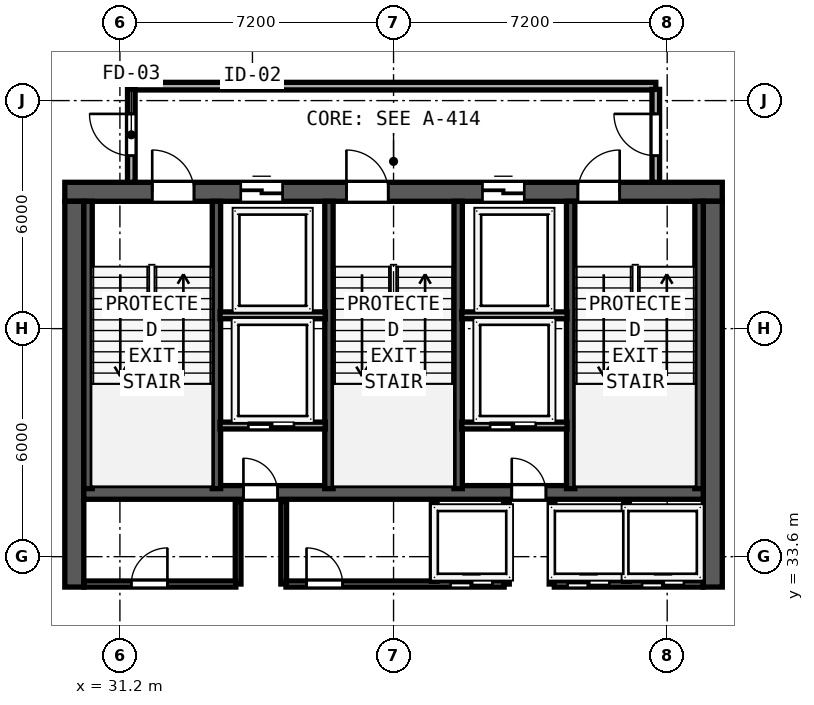
"""IFC4 building model, lengths in metres.
Left out: names, types, materials, properties, quantities, classifications, styles, units other than length and angle.
Written with IfcOpenShell. Run it as: python <this file> out.ifc"""

import sys

from ifc_helpers import new_model, si_unit, direction, frame, frame_2d, origin, place, context, subcontext, project, spatial, rectangle, extrude, element, fill, save


model = new_model("IFC4")
c1 = context("Model", 3, precision=1e-05, world=origin(), true_north=direction((0.0, 1.0)))
c2 = subcontext(c1, "Body", "Model", "MODEL_VIEW")
j1 = project(units=[si_unit("LENGTHUNIT", "METRE"), si_unit("PLANEANGLEUNIT", "RADIAN")], contexts=[c1])
p1 = place(None, origin())
s1 = spatial("IfcSite", under=j1, at=p1, CompositionType="ELEMENT")
p2 = place(p1, origin())
s2 = spatial("IfcBuilding", under=s1, at=p2, CompositionType="ELEMENT")
p3 = place(p2, frame((0.0, 0.0, 286.1)))
s3 = spatial("IfcBuildingStorey", under=s2, at=p3, CompositionType="ELEMENT", Elevation=286.1)
p4 = place(p3, frame((29.75, 43.2, 0.0), z_axis=(0.0, 0.0, 1.0), x_axis=(1.0, 0.0, 0.0)))
e1 = element("IfcWall", 1, at=p4, inside=s3, PredefinedType="SHEAR", context=c2, shape_type="SweptSolid", body=[
    extrude(rectangle(XDim=17.3, YDim=0.5, at=frame_2d((8.65, 0.0))), origin(), (0.0, 0.0, 1.0), 3.72),
])
p5 = place(p4, frame((2.3, 0.0, 0.0)))
e2 = element("IfcOpeningElement", 2, at=p5, cuts=e1, PredefinedType="OPENING", context=c2, shape_type="SweptSolid", body=[
    extrude(rectangle(XDim=1.1, YDim=2.15, at=frame_2d((0.55, 1.075))), frame((0.0, 0.26, 0.0), z_axis=(0.0, -1.0, 0.0), x_axis=(1.0, 0.0, 0.0)), (0.0, 0.0, 1.0), 0.52),
])
p6 = place(p4, frame((7.41, 0.0, 0.0)))
e3 = element("IfcOpeningElement", 3, at=p6, cuts=e1, PredefinedType="OPENING", context=c2, shape_type="SweptSolid", body=[
    extrude(rectangle(XDim=1.1, YDim=2.15, at=frame_2d((0.55, 1.075))), frame((0.0, 0.26, 0.0), z_axis=(0.0, -1.0, 0.0), x_axis=(1.0, 0.0, 0.0)), (0.0, 0.0, 1.0), 0.52),
])
p7 = place(p4, frame((13.5, 0.0, 0.0)))
e4 = element("IfcOpeningElement", 4, at=p7, cuts=e1, PredefinedType="OPENING", context=c2, shape_type="SweptSolid", body=[
    extrude(rectangle(XDim=1.1, YDim=2.15, at=frame_2d((0.55, 1.075))), frame((0.0, 0.26, 0.0), z_axis=(0.0, -1.0, 0.0), x_axis=(1.0, 0.0, 0.0)), (0.0, 0.0, 1.0), 0.52),
])
p8 = place(p4, frame((4.63, 0.0, 0.0)))
e5 = element("IfcOpeningElement", 5, at=p8, cuts=e1, PredefinedType="OPENING", context=c2, shape_type="SweptSolid", body=[
    extrude(rectangle(XDim=1.1, YDim=2.2, at=frame_2d((0.55, 1.1))), frame((0.0, 0.26, 0.0), z_axis=(0.0, -1.0, 0.0), x_axis=(1.0, 0.0, 0.0)), (0.0, 0.0, 1.0), 0.52),
])
p9 = place(p4, frame((10.99, 0.0, 0.0)))
e6 = element("IfcOpeningElement", 6, at=p9, cuts=e1, PredefinedType="OPENING", context=c2, shape_type="SweptSolid", body=[
    extrude(rectangle(XDim=1.1, YDim=2.2, at=frame_2d((0.55, 1.1))), frame((0.0, 0.26, 0.0), z_axis=(0.0, -1.0, 0.0), x_axis=(1.0, 0.0, 0.0)), (0.0, 0.0, 1.0), 0.52),
])
for number, where, z_axis, x_axis in (
    (7, (30.0, 32.8, 0.0), (0.0, 0.0, 1.0), (0.0, 1.0, 0.0)),
    (8, (46.8, 32.8, 0.0), (0.0, 0.0, 1.0), (0.0, 1.0, 0.0)),
):
    element("IfcWall", number, at=place(p3, frame(where, z_axis=z_axis, x_axis=x_axis)), inside=s3, PredefinedType="SHEAR", context=c2, shape_type="SweptSolid", body=[
        extrude(rectangle(XDim=10.15, YDim=0.5, at=frame_2d((5.075, 0.0))), origin(), (0.0, 0.0, 1.0), 3.72),
    ])
p10 = place(p3, frame((30.25, 35.29, 0.0), z_axis=(0.0, 0.0, 1.0), x_axis=(1.0, 0.0, 0.0)))
e9 = element("IfcWall", 9, at=p10, inside=s3, PredefinedType="SHEAR", context=c2, shape_type="SweptSolid", body=[
    extrude(rectangle(XDim=16.3, YDim=0.36, at=frame_2d((8.15, 0.0))), origin(), (0.0, 0.0, 1.0), 3.72),
])
p11 = place(p10, frame((5.1, 0.0, 0.0), z_axis=(0.0, 0.0, 1.0), x_axis=(-1.0, 0.0, 0.0)))
e10 = element("IfcOpeningElement", 10, at=p11, cuts=e9, PredefinedType="OPENING", context=c2, shape_type="SweptSolid", body=[
    extrude(rectangle(XDim=0.9, YDim=2.1, at=frame_2d((0.45, 1.05))), frame((0.0, 0.19, 0.0), z_axis=(0.0, -1.0, 0.0), x_axis=(1.0, 0.0, 0.0)), (0.0, 0.0, 1.0), 0.38),
])
p12 = place(p10, frame((12.16, 0.0, 0.0), z_axis=(0.0, 0.0, 1.0), x_axis=(-1.0, 0.0, 0.0)))
e11 = element("IfcOpeningElement", 11, at=p12, cuts=e9, PredefinedType="OPENING", context=c2, shape_type="SweptSolid", body=[
    extrude(rectangle(XDim=0.9, YDim=2.1, at=frame_2d((0.45, 1.05))), frame((0.0, 0.19, 0.0), z_axis=(0.0, -1.0, 0.0), x_axis=(1.0, 0.0, 0.0)), (0.0, 0.0, 1.0), 0.38),
])
for number, where, z_axis, x_axis in (
    (12, (30.362, 35.39, 0.0), (0.0, 0.0, 1.0), (0.0, 1.0, 0.0)),
    (13, (33.74, 35.39, 0.0), (0.0, 0.0, 1.0), (0.0, 1.0, 0.0)),
    (14, (36.7, 35.39, 0.0), (0.0, 0.0, 1.0), (0.0, 1.0, 0.0)),
    (15, (40.1, 35.39, 0.0), (0.0, 0.0, 1.0), (0.0, 1.0, 0.0)),
    (16, (43.06, 35.39, 0.0), (0.0, 0.0, 1.0), (0.0, 1.0, 0.0)),
    (17, (46.438, 35.39, 0.0), (0.0, 0.0, 1.0), (0.0, 1.0, 0.0)),
):
    element("IfcWall", number, at=place(p3, frame(where, z_axis=z_axis, x_axis=x_axis)), inside=s3, PredefinedType="SHEAR", context=c2, shape_type="SweptSolid", body=[
        extrude(rectangle(XDim=7.56, YDim=0.22, at=frame_2d((3.78, 0.0))), origin(), (0.0, 0.0, 1.0), 3.72),
    ])
p13 = place(p3, frame((31.5, 45.98, 0.0), z_axis=(0.0, 0.0, 1.0), x_axis=(1.0, 0.0, 0.0)))
e18 = element("IfcWall", 18, at=p13, inside=s3, PredefinedType="SOLIDWALL", context=c2, shape_type="SweptSolid", body=[
    extrude(rectangle(XDim=13.8, YDim=0.2, at=frame_2d((6.9, 0.0))), origin(), (0.0, 0.0, 1.0), 3.72),
])
p14 = place(p3, frame((31.5, 43.45, 0.0), z_axis=(0.0, 0.0, 1.0), x_axis=(0.0, 1.0, 0.0)))
e19 = element("IfcWall", 19, at=p14, inside=s3, PredefinedType="SOLIDWALL", context=c2, shape_type="SweptSolid", body=[
    extrude(rectangle(XDim=2.445, YDim=0.2, at=frame_2d((1.223, 0.0))), origin(), (0.0, 0.0, 1.0), 3.72),
])
p15 = place(p14, frame((1.8, 0.0, 0.0), z_axis=(0.0, 0.0, 1.0), x_axis=(-1.0, 0.0, 0.0)))
e20 = element("IfcOpeningElement", 20, at=p15, cuts=e19, PredefinedType="OPENING", context=c2, shape_type="SweptSolid", body=[
    extrude(rectangle(XDim=1.1, YDim=2.15, at=frame_2d((0.55, 1.075))), frame((0.0, 0.11, 0.0), z_axis=(0.0, -1.0, 0.0), x_axis=(1.0, 0.0, 0.0)), (0.0, 0.0, 1.0), 0.22),
])
p16 = place(p3, frame((45.3, 43.45, 0.0), z_axis=(0.0, 0.0, 1.0), x_axis=(0.0, 1.0, 0.0)))
e21 = element("IfcWall", 21, at=p16, inside=s3, PredefinedType="SOLIDWALL", context=c2, shape_type="SweptSolid", body=[
    extrude(rectangle(XDim=2.445, YDim=0.2, at=frame_2d((1.223, 0.0))), origin(), (0.0, 0.0, 1.0), 3.72),
])
p17 = place(p16, frame((0.7, 0.0, 0.0)))
e22 = element("IfcOpeningElement", 22, at=p17, cuts=e21, PredefinedType="OPENING", context=c2, shape_type="SweptSolid", body=[
    extrude(rectangle(XDim=1.1, YDim=2.15, at=frame_2d((0.55, 1.075))), frame((0.0, 0.11, 0.0), z_axis=(0.0, -1.0, 0.0), x_axis=(1.0, 0.0, 0.0)), (0.0, 0.0, 1.0), 0.22),
])
for number, where, z_axis, x_axis in (
    (23, (33.835, 39.95, 0.0), (0.0, 0.0, 1.0), (1.0, 0.0, 0.0)),
    (24, (40.195, 39.95, 0.0), (0.0, 0.0, 1.0), (1.0, 0.0, 0.0)),
):
    element("IfcWall", number, at=place(p3, frame(where, z_axis=z_axis, x_axis=x_axis)), inside=s3, PredefinedType="SOLIDWALL", context=c2, shape_type="SweptSolid", body=[
        extrude(rectangle(XDim=2.77, YDim=0.18, at=frame_2d((1.385, 0.0))), origin(), (0.0, 0.0, 1.0), 3.72),
    ])
p18 = place(p3, frame((33.835, 37.05, 0.0), z_axis=(0.0, 0.0, 1.0), x_axis=(1.0, 0.0, 0.0)))
e25 = element("IfcWall", 25, at=p18, inside=s3, PredefinedType="SOLIDWALL", context=c2, shape_type="SweptSolid", body=[
    extrude(rectangle(XDim=2.77, YDim=0.18, at=frame_2d((1.385, 0.0))), origin(), (0.0, 0.0, 1.0), 3.72),
])
p19 = place(p18, frame((1.945, 0.0, 0.0), z_axis=(0.0, 0.0, 1.0), x_axis=(-1.0, 0.0, 0.0)))
e26 = element("IfcOpeningElement", 26, at=p19, cuts=e25, PredefinedType="OPENING", context=c2, shape_type="SweptSolid", body=[
    extrude(rectangle(XDim=1.2, YDim=2.2, at=frame_2d((0.6, 1.1))), frame((0.0, 0.1, 0.0), z_axis=(0.0, -1.0, 0.0), x_axis=(1.0, 0.0, 0.0)), (0.0, 0.0, 1.0), 0.2),
])
for number, where, z_axis, x_axis in (
    (27, (34.31, 32.88, 0.0), (0.0, 0.0, 1.0), (0.0, 1.0, 0.0)),
    (28, (35.51, 32.88, 0.0), (0.0, 0.0, 1.0), (0.0, 1.0, 0.0)),
):
    element("IfcWall", number, at=place(p3, frame(where, z_axis=z_axis, x_axis=x_axis)), inside=s3, PredefinedType="SOLIDWALL", context=c2, shape_type="SweptSolid", body=[
        extrude(rectangle(XDim=2.17, YDim=0.15, at=frame_2d((1.085, 0.0))), origin(), (0.0, 0.0, 1.0), 3.72),
    ])
p20 = place(p3, frame((40.195, 37.05, 0.0), z_axis=(0.0, 0.0, 1.0), x_axis=(1.0, 0.0, 0.0)))
e29 = element("IfcWall", 29, at=p20, inside=s3, PredefinedType="SOLIDWALL", context=c2, shape_type="SweptSolid", body=[
    extrude(rectangle(XDim=2.77, YDim=0.18, at=frame_2d((1.385, 0.0))), origin(), (0.0, 0.0, 1.0), 3.72),
])
p21 = place(p20, frame((1.945, 0.0, 0.0), z_axis=(0.0, 0.0, 1.0), x_axis=(-1.0, 0.0, 0.0)))
e30 = element("IfcOpeningElement", 30, at=p21, cuts=e29, PredefinedType="OPENING", context=c2, shape_type="SweptSolid", body=[
    extrude(rectangle(XDim=1.2, YDim=2.2, at=frame_2d((0.6, 1.1))), frame((0.0, 0.1, 0.0), z_axis=(0.0, -1.0, 0.0), x_axis=(1.0, 0.0, 0.0)), (0.0, 0.0, 1.0), 0.2),
])
for number, where, z_axis, x_axis in (
    (31, (41.37, 32.88, 0.0), (0.0, 0.0, 1.0), (0.0, 1.0, 0.0)),
    (32, (42.57, 32.88, 0.0), (0.0, 0.0, 1.0), (0.0, 1.0, 0.0)),
):
    element("IfcWall", number, at=place(p3, frame(where, z_axis=z_axis, x_axis=x_axis)), inside=s3, PredefinedType="SOLIDWALL", context=c2, shape_type="SweptSolid", body=[
        extrude(rectangle(XDim=2.17, YDim=0.15, at=frame_2d((1.085, 0.0))), origin(), (0.0, 0.0, 1.0), 3.72),
    ])
p22 = place(p3, frame((30.25, 32.88, 0.0), z_axis=(0.0, 0.0, 1.0), x_axis=(1.0, 0.0, 0.0)))
e33 = element("IfcWall", 33, at=p22, inside=s3, PredefinedType="SOLIDWALL", context=c2, shape_type="SweptSolid", body=[
    extrude(rectangle(XDim=4.0, YDim=0.16, at=frame_2d((2.0, 0.0))), origin(), (0.0, 0.0, 1.0), 3.72),
])
p23 = place(p22, frame((2.2, 0.0, 0.0), z_axis=(0.0, 0.0, 1.0), x_axis=(-1.0, 0.0, 0.0)))
e34 = element("IfcOpeningElement", 34, at=p23, cuts=e33, PredefinedType="OPENING", context=c2, shape_type="SweptSolid", body=[
    extrude(rectangle(XDim=0.95, YDim=2.12, at=frame_2d((0.475, 1.06))), frame((0.0, 0.09, 0.0), z_axis=(0.0, -1.0, 0.0), x_axis=(1.0, 0.0, 0.0)), (0.0, 0.0, 1.0), 0.18),
])
p24 = place(p3, frame((35.57, 32.88, 0.0), z_axis=(0.0, 0.0, 1.0), x_axis=(1.0, 0.0, 0.0)))
e35 = element("IfcWall", 35, at=p24, inside=s3, PredefinedType="SOLIDWALL", context=c2, shape_type="SweptSolid", body=[
    extrude(rectangle(XDim=5.74, YDim=0.16, at=frame_2d((2.87, 0.0))), origin(), (0.0, 0.0, 1.0), 3.72),
])
p25 = place(p24, frame((1.49, 0.0, 0.0), z_axis=(0.0, 0.0, 1.0), x_axis=(-1.0, 0.0, 0.0)))
e36 = element("IfcOpeningElement", 36, at=p25, cuts=e35, PredefinedType="OPENING", context=c2, shape_type="SweptSolid", body=[
    extrude(rectangle(XDim=0.95, YDim=2.12, at=frame_2d((0.475, 1.06))), frame((0.0, 0.09, 0.0), z_axis=(0.0, -1.0, 0.0), x_axis=(1.0, 0.0, 0.0)), (0.0, 0.0, 1.0), 0.18),
])
p26 = place(p24, frame((5.43, 0.0, 0.0), z_axis=(0.0, 0.0, 1.0), x_axis=(-1.0, 0.0, 0.0)))
e37 = element("IfcOpeningElement", 37, at=p26, cuts=e35, PredefinedType="OPENING", context=c2, shape_type="SweptSolid", body=[
    extrude(rectangle(XDim=1.1, YDim=2.2, at=frame_2d((0.55, 1.1))), frame((0.0, 0.09, 0.0), z_axis=(0.0, -1.0, 0.0), x_axis=(1.0, 0.0, 0.0)), (0.0, 0.0, 1.0), 0.18),
])
p27 = place(p3, frame((42.63, 32.88, 0.0), z_axis=(0.0, 0.0, 1.0), x_axis=(1.0, 0.0, 0.0)))
e38 = element("IfcWall", 38, at=p27, inside=s3, PredefinedType="SOLIDWALL", context=c2, shape_type="SweptSolid", body=[
    extrude(rectangle(XDim=3.92, YDim=0.16, at=frame_2d((1.96, 0.0))), origin(), (0.0, 0.0, 1.0), 3.72),
])
p28 = place(p27, frame((1.45, 0.0, 0.0), z_axis=(0.0, 0.0, 1.0), x_axis=(-1.0, 0.0, 0.0)))
e39 = element("IfcOpeningElement", 39, at=p28, cuts=e38, PredefinedType="OPENING", context=c2, shape_type="SweptSolid", body=[
    extrude(rectangle(XDim=1.1, YDim=2.2, at=frame_2d((0.55, 1.1))), frame((0.0, 0.09, 0.0), z_axis=(0.0, -1.0, 0.0), x_axis=(1.0, 0.0, 0.0)), (0.0, 0.0, 1.0), 0.18),
])
p29 = place(p27, frame((3.41, 0.0, 0.0), z_axis=(0.0, 0.0, 1.0), x_axis=(-1.0, 0.0, 0.0)))
e40 = element("IfcOpeningElement", 40, at=p29, cuts=e38, PredefinedType="OPENING", context=c2, shape_type="SweptSolid", body=[
    extrude(rectangle(XDim=1.1, YDim=2.2, at=frame_2d((0.55, 1.1))), frame((0.0, 0.09, 0.0), z_axis=(0.0, -1.0, 0.0), x_axis=(1.0, 0.0, 0.0)), (0.0, 0.0, 1.0), 0.18),
])
for number, where, z_axis, x_axis in (
    (41, (39.47, 32.95, 0.0), (0.0, 0.0, 1.0), (0.0, 1.0, 0.0)),
    (42, (44.53, 32.95, 0.0), (0.0, 0.0, 1.0), (0.0, 1.0, 0.0)),
):
    element("IfcWall", number, at=place(p3, frame(where, z_axis=z_axis, x_axis=x_axis)), inside=s3, PredefinedType="SOLIDWALL", context=c2, shape_type="SweptSolid", body=[
        extrude(rectangle(XDim=2.05, YDim=0.15, at=frame_2d((1.025, 0.0))), origin(), (0.0, 0.0, 1.0), 3.72),
    ])
p30 = place(p5, origin())
e43 = element("IfcDoor", 43, at=p30, inside=s3, OperationType="SINGLE_SWING_LEFT", PredefinedType="DOOR", context=c2, shape_type="SweptSolid", body=[
    extrude(rectangle(XDim=1.1, YDim=2.15, at=frame_2d((0.55, 1.075))), frame((0.0, 0.185, 0.0), z_axis=(0.0, -1.0, 0.0), x_axis=(1.0, 0.0, 0.0)), (0.0, 0.0, 1.0), 0.05),
])
fill(e2, e43)
p31 = place(p6, origin())
e44 = element("IfcDoor", 44, at=p31, inside=s3, OperationType="SINGLE_SWING_LEFT", PredefinedType="DOOR", context=c2, shape_type="SweptSolid", body=[
    extrude(rectangle(XDim=1.1, YDim=2.15, at=frame_2d((0.55, 1.075))), frame((0.0, 0.185, 0.0), z_axis=(0.0, -1.0, 0.0), x_axis=(1.0, 0.0, 0.0)), (0.0, 0.0, 1.0), 0.05),
])
fill(e3, e44)
p32 = place(p7, origin())
e45 = element("IfcDoor", 45, at=p32, inside=s3, OperationType="SINGLE_SWING_RIGHT", PredefinedType="DOOR", context=c2, shape_type="SweptSolid", body=[
    extrude(rectangle(XDim=1.1, YDim=2.15, at=frame_2d((0.55, 1.075))), frame((0.0, 0.185, 0.0), z_axis=(0.0, -1.0, 0.0), x_axis=(1.0, 0.0, 0.0)), (0.0, 0.0, 1.0), 0.05),
])
fill(e4, e45)
p33 = place(p15, origin())
e46 = element("IfcDoor", 46, at=p33, inside=s3, OperationType="SINGLE_SWING_LEFT", PredefinedType="DOOR", context=c2, shape_type="SweptSolid", body=[
    extrude(rectangle(XDim=1.1, YDim=2.15, at=frame_2d((0.55, 1.075))), frame((0.0, 0.025, 0.0), z_axis=(0.0, -1.0, 0.0), x_axis=(1.0, 0.0, 0.0)), (0.0, 0.0, 1.0), 0.05),
])
fill(e20, e46)
p34 = place(p17, origin())
e47 = element("IfcDoor", 47, at=p34, inside=s3, OperationType="SINGLE_SWING_RIGHT", PredefinedType="DOOR", context=c2, shape_type="SweptSolid", body=[
    extrude(rectangle(XDim=1.1, YDim=2.15, at=frame_2d((0.55, 1.075))), frame((0.0, 0.025, 0.0), z_axis=(0.0, -1.0, 0.0), x_axis=(1.0, 0.0, 0.0)), (0.0, 0.0, 1.0), 0.05),
])
fill(e22, e47)
p35 = place(p8, origin())
e48 = element("IfcDoor", 48, at=p35, inside=s3, OperationType="SLIDING_TO_LEFT", PredefinedType="DOOR", context=c2, shape_type="SweptSolid", body=[
    extrude(rectangle(XDim=1.1, YDim=2.2, at=frame_2d((0.55, 1.1))), frame((0.0, 0.185, 0.0), z_axis=(0.0, -1.0, 0.0), x_axis=(1.0, 0.0, 0.0)), (0.0, 0.0, 1.0), 0.05),
])
fill(e5, e48)
p36 = place(p9, origin())
e49 = element("IfcDoor", 49, at=p36, inside=s3, OperationType="SLIDING_TO_LEFT", PredefinedType="DOOR", context=c2, shape_type="SweptSolid", body=[
    extrude(rectangle(XDim=1.1, YDim=2.2, at=frame_2d((0.55, 1.1))), frame((0.0, 0.185, 0.0), z_axis=(0.0, -1.0, 0.0), x_axis=(1.0, 0.0, 0.0)), (0.0, 0.0, 1.0), 0.05),
])
fill(e6, e49)
p37 = place(p19, origin())
e50 = element("IfcDoor", 50, at=p37, inside=s3, OperationType="SLIDING_TO_RIGHT", PredefinedType="DOOR", context=c2, shape_type="SweptSolid", body=[
    extrude(rectangle(XDim=1.2, YDim=2.2, at=frame_2d((0.6, 1.1))), frame((0.0, 0.025, 0.0), z_axis=(0.0, -1.0, 0.0), x_axis=(1.0, 0.0, 0.0)), (0.0, 0.0, 1.0), 0.05),
])
fill(e26, e50)
p38 = place(p11, origin())
e51 = element("IfcDoor", 51, at=p38, inside=s3, OperationType="SINGLE_SWING_RIGHT", PredefinedType="DOOR", context=c2, shape_type="SweptSolid", body=[
    extrude(rectangle(XDim=0.9, YDim=2.1, at=frame_2d((0.45, 1.05))), frame((0.0, 0.025, 0.0), z_axis=(0.0, -1.0, 0.0), x_axis=(1.0, 0.0, 0.0)), (0.0, 0.0, 1.0), 0.05),
])
fill(e10, e51)
p39 = place(p21, origin())
e52 = element("IfcDoor", 52, at=p39, inside=s3, OperationType="SLIDING_TO_RIGHT", PredefinedType="DOOR", context=c2, shape_type="SweptSolid", body=[
    extrude(rectangle(XDim=1.2, YDim=2.2, at=frame_2d((0.6, 1.1))), frame((0.0, 0.025, 0.0), z_axis=(0.0, -1.0, 0.0), x_axis=(1.0, 0.0, 0.0)), (0.0, 0.0, 1.0), 0.05),
])
fill(e30, e52)
p40 = place(p12, origin())
e53 = element("IfcDoor", 53, at=p40, inside=s3, OperationType="SINGLE_SWING_RIGHT", PredefinedType="DOOR", context=c2, shape_type="SweptSolid", body=[
    extrude(rectangle(XDim=0.9, YDim=2.1, at=frame_2d((0.45, 1.05))), frame((0.0, 0.025, 0.0), z_axis=(0.0, -1.0, 0.0), x_axis=(1.0, 0.0, 0.0)), (0.0, 0.0, 1.0), 0.05),
])
fill(e11, e53)
p41 = place(p23, origin())
e54 = element("IfcDoor", 54, at=p41, inside=s3, OperationType="SINGLE_SWING_LEFT", PredefinedType="DOOR", context=c2, shape_type="SweptSolid", body=[
    extrude(rectangle(XDim=0.95, YDim=2.12, at=frame_2d((0.475, 1.06))), frame((0.0, 0.025, 0.0), z_axis=(0.0, -1.0, 0.0), x_axis=(1.0, 0.0, 0.0)), (0.0, 0.0, 1.0), 0.05),
])
fill(e34, e54)
p42 = place(p25, origin())
e55 = element("IfcDoor", 55, at=p42, inside=s3, OperationType="SINGLE_SWING_RIGHT", PredefinedType="DOOR", context=c2, shape_type="SweptSolid", body=[
    extrude(rectangle(XDim=0.95, YDim=2.12, at=frame_2d((0.475, 1.06))), frame((0.0, 0.025, 0.0), z_axis=(0.0, -1.0, 0.0), x_axis=(1.0, 0.0, 0.0)), (0.0, 0.0, 1.0), 0.05),
])
fill(e36, e55)
p43 = place(p26, origin())
e56 = element("IfcDoor", 56, at=p43, inside=s3, OperationType="SLIDING_TO_RIGHT", PredefinedType="DOOR", context=c2, shape_type="SweptSolid", body=[
    extrude(rectangle(XDim=1.1, YDim=2.2, at=frame_2d((0.55, 1.1))), frame((0.0, 0.025, 0.0), z_axis=(0.0, -1.0, 0.0), x_axis=(1.0, 0.0, 0.0)), (0.0, 0.0, 1.0), 0.05),
])
fill(e37, e56)
p44 = place(p28, origin())
e57 = element("IfcDoor", 57, at=p44, inside=s3, OperationType="SLIDING_TO_RIGHT", PredefinedType="DOOR", context=c2, shape_type="SweptSolid", body=[
    extrude(rectangle(XDim=1.1, YDim=2.2, at=frame_2d((0.55, 1.1))), frame((0.0, 0.025, 0.0), z_axis=(0.0, -1.0, 0.0), x_axis=(1.0, 0.0, 0.0)), (0.0, 0.0, 1.0), 0.05),
])
fill(e39, e57)
p45 = place(p29, origin())
e58 = element("IfcDoor", 58, at=p45, inside=s3, OperationType="SLIDING_TO_RIGHT", PredefinedType="DOOR", context=c2, shape_type="SweptSolid", body=[
    extrude(rectangle(XDim=1.1, YDim=2.2, at=frame_2d((0.55, 1.1))), frame((0.0, 0.025, 0.0), z_axis=(0.0, -1.0, 0.0), x_axis=(1.0, 0.0, 0.0)), (0.0, 0.0, 1.0), 0.05),
])
fill(e40, e58)
save(model, sys.argv[1])
